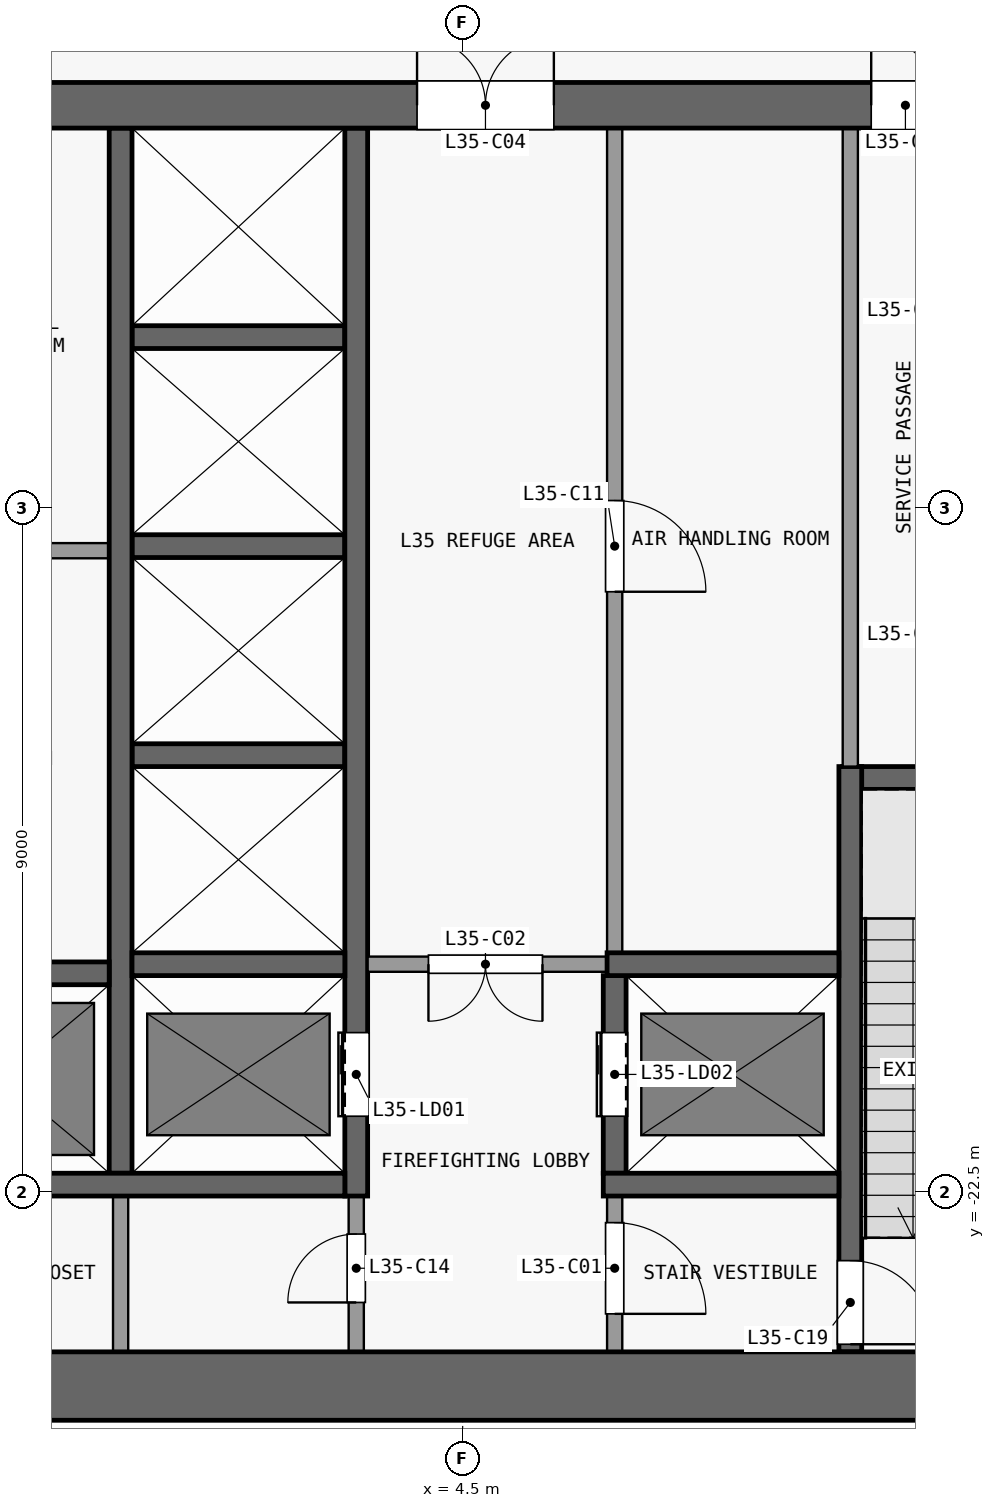
"""IFC4 building model, lengths in metres.
Left out: names, types, materials, properties, quantities, classifications, styles, units other than length and angle.
Written with IfcOpenShell. Run it as: python <this file> out.ifc"""

import sys

from ifc_helpers import new_model, si_unit, direction, frame, frame_2d, origin, place, context, subcontext, project, spatial, rectangle, extrude, element, fill, save


model = new_model("IFC4")
c1 = context("Model", 3, precision=1e-05, world=origin(), true_north=direction((0.0, 1.0)))
c2 = subcontext(c1, "Body", "Model", "MODEL_VIEW")
j1 = project(units=[si_unit("LENGTHUNIT", "METRE"), si_unit("PLANEANGLEUNIT", "RADIAN")], contexts=[c1])
p1 = place(None, origin())
s1 = spatial("IfcSite", under=j1, at=p1, CompositionType="ELEMENT")
p2 = place(p1, origin())
s2 = spatial("IfcBuilding", under=s1, at=p2, CompositionType="ELEMENT")
p3 = place(p2, frame((0.0, 0.0, 143.9)))
s3 = spatial("IfcBuildingStorey", under=s2, at=p3, CompositionType="ELEMENT", Elevation=143.9)
p4 = place(p3, frame((-13.5, -25.05, 0.0), z_axis=(0.0, 0.0, 1.0), x_axis=(1.0, 0.0, 0.0)))
e1 = element("IfcWall", 1, at=p4, inside=s3, PredefinedType="SHEAR", context=c2, shape_type="SweptSolid", body=[
    extrude(rectangle(XDim=27.0, YDim=0.9, at=frame_2d((13.5, 0.0))), origin(), (0.0, 0.0, 1.0), 5.0),
])
p5 = place(p3, frame((-13.5, -8.2, 0.0), z_axis=(0.0, 0.0, 1.0), x_axis=(1.0, 0.0, 0.0)))
e2 = element("IfcWall", 2, at=p5, inside=s3, PredefinedType="SHEAR", context=c2, shape_type="SweptSolid", body=[
    extrude(rectangle(XDim=27.0, YDim=0.6, at=frame_2d((13.5, 0.0))), origin(), (0.0, 0.0, 1.0), 5.0),
])
p6 = place(p5, frame((7.8, 0.0, 0.0)))
e3 = element("IfcOpeningElement", 3, at=p6, cuts=e2, PredefinedType="OPENING", context=c2, shape_type="SweptSolid", body=[
    extrude(rectangle(XDim=1.8, YDim=2.1, at=frame_2d((0.9, 1.05))), frame((0.0, 0.31, 0.0), z_axis=(0.0, -1.0, 0.0), x_axis=(1.0, 0.0, 0.0)), (0.0, 0.0, 1.0), 0.62),
])
p7 = place(p5, frame((17.4, 0.0, 0.0)))
e4 = element("IfcOpeningElement", 4, at=p7, cuts=e2, PredefinedType="OPENING", context=c2, shape_type="SweptSolid", body=[
    extrude(rectangle(XDim=1.8, YDim=2.1, at=frame_2d((0.9, 1.05))), frame((0.0, 0.31, 0.0), z_axis=(0.0, -1.0, 0.0), x_axis=(1.0, 0.0, 0.0)), (0.0, 0.0, 1.0), 0.62),
])
p8 = place(p5, frame((2.725, 0.0, 0.0)))
e5 = element("IfcOpeningElement", 5, at=p8, cuts=e2, PredefinedType="OPENING", context=c2, shape_type="SweptSolid", body=[
    extrude(rectangle(XDim=0.9, YDim=2.1, at=frame_2d((0.45, 1.05))), frame((0.0, 0.31, 0.0), z_axis=(0.0, -1.0, 0.0), x_axis=(1.0, 0.0, 0.0)), (0.0, 0.0, 1.0), 0.62),
])
p9 = place(p5, frame((23.375, 0.0, 0.0)))
e6 = element("IfcOpeningElement", 6, at=p9, cuts=e2, PredefinedType="OPENING", context=c2, shape_type="SweptSolid", body=[
    extrude(rectangle(XDim=0.9, YDim=2.1, at=frame_2d((0.45, 1.05))), frame((0.0, 0.31, 0.0), z_axis=(0.0, -1.0, 0.0), x_axis=(1.0, 0.0, 0.0)), (0.0, 0.0, 1.0), 0.62),
])
p10 = place(p3, frame((-3.25, -22.4, 0.0), z_axis=(0.0, 0.0, 1.0), x_axis=(1.0, 0.0, 0.0)))
e7 = element("IfcWall", 7, at=p10, inside=s3, PredefinedType="SHEAR", context=c2, shape_type="SweptSolid", body=[
    extrude(rectangle(XDim=6.2, YDim=0.3, at=frame_2d((3.1, 0.0))), origin(), (0.0, 0.0, 1.0), 5.0),
])
p11 = place(p3, frame((6.35, -22.4, 0.0), z_axis=(0.0, 0.0, 1.0), x_axis=(1.0, 0.0, 0.0)))
e8 = element("IfcWall", 8, at=p11, inside=s3, PredefinedType="SHEAR", context=c2, shape_type="SweptSolid", body=[
    extrude(rectangle(XDim=3.1, YDim=0.3, at=frame_2d((1.55, 0.0))), origin(), (0.0, 0.0, 1.0), 5.0),
])
p12 = place(p3, frame((-3.2, -19.62, 0.0), z_axis=(0.0, 0.0, 1.0), x_axis=(1.0, 0.0, 0.0)))
e9 = element("IfcWall", 9, at=p12, inside=s3, PredefinedType="SHEAR", context=c2, shape_type="SweptSolid", body=[
    extrude(rectangle(XDim=3.05, YDim=0.3, at=frame_2d((1.525, 0.0))), origin(), (0.0, 0.0, 1.0), 5.0),
])
p13 = place(p3, frame((0.15, -19.5, 0.0), z_axis=(0.0, 0.0, 1.0), x_axis=(1.0, 0.0, 0.0)))
e10 = element("IfcWall", 10, at=p13, inside=s3, PredefinedType="SHEAR", context=c2, shape_type="SweptSolid", body=[
    extrude(rectangle(XDim=2.8, YDim=0.3, at=frame_2d((1.4, 0.0))), origin(), (0.0, 0.0, 1.0), 5.0),
])
p14 = place(p3, frame((6.4, -19.5, 0.0), z_axis=(0.0, 0.0, 1.0), x_axis=(-1.0, 0.0, 0.0)))
e11 = element("IfcWall", 11, at=p14, inside=s3, PredefinedType="PARTITIONING", context=c2, shape_type="SweptSolid", body=[
    extrude(rectangle(XDim=3.15, YDim=0.2, at=frame_2d((1.575, 0.0))), origin(), (0.0, 0.0, 1.0), 5.0),
])
p15 = place(p14, frame((0.85, 0.0, 0.0)))
e12 = element("IfcOpeningElement", 12, at=p15, cuts=e11, PredefinedType="OPENING", context=c2, shape_type="SweptSolid", body=[
    extrude(rectangle(XDim=1.5, YDim=2.1, at=frame_2d((0.75, 1.05))), frame((0.0, 0.11, 0.0), z_axis=(0.0, -1.0, 0.0), x_axis=(1.0, 0.0, 0.0)), (0.0, 0.0, 1.0), 0.22),
])
p16 = place(p3, frame((6.4, -19.5, 0.0), z_axis=(0.0, 0.0, 1.0), x_axis=(1.0, 0.0, 0.0)))
e13 = element("IfcWall", 13, at=p16, inside=s3, PredefinedType="SHEAR", context=c2, shape_type="SweptSolid", body=[
    extrude(rectangle(XDim=3.05, YDim=0.3, at=frame_2d((1.525, 0.0))), origin(), (0.0, 0.0, 1.0), 5.0),
])
p17 = place(p3, frame((9.5, -17.05, 0.0), z_axis=(0.0, 0.0, 1.0), x_axis=(1.0, 0.0, 0.0)))
e14 = element("IfcWall", 14, at=p17, inside=s3, PredefinedType="SHEAR", context=c2, shape_type="SweptSolid", body=[
    extrude(rectangle(XDim=3.1, YDim=0.3, at=frame_2d((1.55, 0.0))), origin(), (0.0, 0.0, 1.0), 5.0),
])
p18 = place(p3, frame((0.15, -16.75, 0.0), z_axis=(0.0, 0.0, 1.0), x_axis=(1.0, 0.0, 0.0)))
e15 = element("IfcWall", 15, at=p18, inside=s3, PredefinedType="SHEAR", context=c2, shape_type="SweptSolid", body=[
    extrude(rectangle(XDim=2.8, YDim=0.3, at=frame_2d((1.4, 0.0))), origin(), (0.0, 0.0, 1.0), 5.0),
])
p19 = place(p3, frame((-3.0, -14.06, 0.0), z_axis=(0.0, 0.0, 1.0), x_axis=(1.0, 0.0, 0.0)))
e16 = element("IfcWall", 16, at=p19, inside=s3, PredefinedType="PARTITIONING", context=c2, shape_type="SweptSolid", body=[
    extrude(rectangle(XDim=2.85, YDim=0.2, at=frame_2d((1.425, 0.0))), origin(), (0.0, 0.0, 1.0), 5.0),
])
for number, where, z_axis, x_axis in (
    (17, (0.15, -14.0, 0.0), (0.0, 0.0, 1.0), (1.0, 0.0, 0.0)),
    (18, (0.15, -11.25, 0.0), (0.0, 0.0, 1.0), (1.0, 0.0, 0.0)),
):
    element("IfcWall", number, at=place(p3, frame(where, z_axis=z_axis, x_axis=x_axis)), inside=s3, PredefinedType="SHEAR", context=c2, shape_type="SweptSolid", body=[
        extrude(rectangle(XDim=2.8, YDim=0.3, at=frame_2d((1.4, 0.0))), origin(), (0.0, 0.0, 1.0), 5.0),
    ])
p20 = place(p3, frame((0.0, -24.6, 0.0), z_axis=(0.0, 0.0, 1.0), x_axis=(0.0, 1.0, 0.0)))
e19 = element("IfcWall", 19, at=p20, inside=s3, PredefinedType="PARTITIONING", context=c2, shape_type="SweptSolid", body=[
    extrude(rectangle(XDim=2.05, YDim=0.2, at=frame_2d((1.025, 0.0))), origin(), (0.0, 0.0, 1.0), 5.0),
])
p21 = place(p3, frame((0.0, -22.25, 0.0), z_axis=(0.0, 0.0, 1.0), x_axis=(0.0, 1.0, 0.0)))
e20 = element("IfcWall", 20, at=p21, inside=s3, PredefinedType="SHEAR", context=c2, shape_type="SweptSolid", body=[
    extrude(rectangle(XDim=13.75, YDim=0.3, at=frame_2d((6.875, 0.0))), origin(), (0.0, 0.0, 1.0), 5.0),
])
p22 = place(p3, frame((3.1, -24.6, 0.0), z_axis=(0.0, 0.0, 1.0), x_axis=(0.0, 1.0, 0.0)))
e21 = element("IfcWall", 21, at=p22, inside=s3, PredefinedType="PARTITIONING", context=c2, shape_type="SweptSolid", body=[
    extrude(rectangle(XDim=2.05, YDim=0.2, at=frame_2d((1.025, 0.0))), origin(), (0.0, 0.0, 1.0), 5.0),
])
p23 = place(p22, frame((0.65, 0.0, 0.0)))
e22 = element("IfcOpeningElement", 22, at=p23, cuts=e21, PredefinedType="OPENING", context=c2, shape_type="SweptSolid", body=[
    extrude(rectangle(XDim=0.9, YDim=2.1, at=frame_2d((0.45, 1.05))), frame((0.0, 0.11, 0.0), z_axis=(0.0, -1.0, 0.0), x_axis=(1.0, 0.0, 0.0)), (0.0, 0.0, 1.0), 0.22),
])
p24 = place(p3, frame((3.1, -22.55, 0.0), z_axis=(0.0, 0.0, 1.0), x_axis=(0.0, 1.0, 0.0)))
e23 = element("IfcWall", 23, at=p24, inside=s3, PredefinedType="SHEAR", context=c2, shape_type="SweptSolid", body=[
    extrude(rectangle(XDim=14.05, YDim=0.3, at=frame_2d((7.025, 0.0))), origin(), (0.0, 0.0, 1.0), 5.0),
])
p25 = place(p24, frame((1.05, 0.0, 0.0)))
e24 = element("IfcOpeningElement", 24, at=p25, cuts=e23, PredefinedType="OPENING", context=c2, shape_type="SweptSolid", body=[
    extrude(rectangle(XDim=1.1, YDim=2.1, at=frame_2d((0.55, 1.05))), frame((0.0, 0.16, 0.0), z_axis=(0.0, -1.0, 0.0), x_axis=(1.0, 0.0, 0.0)), (0.0, 0.0, 1.0), 0.32),
])
p26 = place(p3, frame((6.5, -22.55, 0.0), z_axis=(0.0, 0.0, 1.0), x_axis=(0.0, -1.0, 0.0)))
e25 = element("IfcWall", 25, at=p26, inside=s3, PredefinedType="PARTITIONING", context=c2, shape_type="SweptSolid", body=[
    extrude(rectangle(XDim=2.05, YDim=0.2, at=frame_2d((1.025, 0.0))), origin(), (0.0, 0.0, 1.0), 5.0),
])
p27 = place(p26, frame((0.35, 0.0, 0.0)))
e26 = element("IfcOpeningElement", 26, at=p27, cuts=e25, PredefinedType="OPENING", context=c2, shape_type="SweptSolid", body=[
    extrude(rectangle(XDim=1.2, YDim=2.1, at=frame_2d((0.6, 1.05))), frame((0.0, 0.11, 0.0), z_axis=(0.0, -1.0, 0.0), x_axis=(1.0, 0.0, 0.0)), (0.0, 0.0, 1.0), 0.22),
])
p28 = place(p3, frame((6.5, -22.25, 0.0), z_axis=(0.0, 0.0, 1.0), x_axis=(0.0, 1.0, 0.0)))
e27 = element("IfcWall", 27, at=p28, inside=s3, PredefinedType="SHEAR", context=c2, shape_type="SweptSolid", body=[
    extrude(rectangle(XDim=2.6, YDim=0.3, at=frame_2d((1.3, 0.0))), origin(), (0.0, 0.0, 1.0), 5.0),
])
p29 = place(p28, frame((0.75, 0.0, 0.0)))
e28 = element("IfcOpeningElement", 28, at=p29, cuts=e27, PredefinedType="OPENING", context=c2, shape_type="SweptSolid", body=[
    extrude(rectangle(XDim=1.1, YDim=2.1, at=frame_2d((0.55, 1.05))), frame((0.0, 0.16, 0.0), z_axis=(0.0, -1.0, 0.0), x_axis=(1.0, 0.0, 0.0)), (0.0, 0.0, 1.0), 0.32),
])
p30 = place(p3, frame((6.5, -8.5, 0.0), z_axis=(0.0, 0.0, 1.0), x_axis=(0.0, -1.0, 0.0)))
e29 = element("IfcWall", 29, at=p30, inside=s3, PredefinedType="PARTITIONING", context=c2, shape_type="SweptSolid", body=[
    extrude(rectangle(XDim=10.85, YDim=0.2, at=frame_2d((5.425, 0.0))), origin(), (0.0, 0.0, 1.0), 5.0),
])
p31 = place(p30, frame((4.9, 0.0, 0.0)))
e30 = element("IfcOpeningElement", 30, at=p31, cuts=e29, PredefinedType="OPENING", context=c2, shape_type="SweptSolid", body=[
    extrude(rectangle(XDim=1.2, YDim=2.1, at=frame_2d((0.6, 1.05))), frame((0.0, 0.11, 0.0), z_axis=(0.0, -1.0, 0.0), x_axis=(1.0, 0.0, 0.0)), (0.0, 0.0, 1.0), 0.22),
])
p32 = place(p3, frame((9.6, -16.9, 0.0), z_axis=(0.0, 0.0, 1.0), x_axis=(0.0, -1.0, 0.0)))
e31 = element("IfcWall", 31, at=p32, inside=s3, PredefinedType="SHEAR", context=c2, shape_type="SweptSolid", body=[
    extrude(rectangle(XDim=7.7, YDim=0.3, at=frame_2d((3.85, 0.0))), origin(), (0.0, 0.0, 1.0), 5.0),
])
p33 = place(p32, frame((6.5, 0.0, 0.0)))
e32 = element("IfcOpeningElement", 32, at=p33, cuts=e31, PredefinedType="OPENING", context=c2, shape_type="SweptSolid", body=[
    extrude(rectangle(XDim=1.1, YDim=2.1, at=frame_2d((0.55, 1.05))), frame((0.0, 0.16, 0.0), z_axis=(0.0, -1.0, 0.0), x_axis=(1.0, 0.0, 0.0)), (0.0, 0.0, 1.0), 0.32),
])
p34 = place(p3, frame((9.6, -16.9, 0.0), z_axis=(0.0, 0.0, 1.0), x_axis=(0.0, 1.0, 0.0)))
e33 = element("IfcWall", 33, at=p34, inside=s3, PredefinedType="PARTITIONING", context=c2, shape_type="SweptSolid", body=[
    extrude(rectangle(XDim=8.4, YDim=0.2, at=frame_2d((4.2, 0.0))), origin(), (0.0, 0.0, 1.0), 5.0),
])
p35 = place(p25, origin())
e34 = element("IfcDoor", 34, at=p35, inside=s3, OperationType="DOUBLE_DOOR_SLIDING", PredefinedType="DOOR", context=c2, shape_type="SweptSolid", body=[
    extrude(rectangle(XDim=1.1, YDim=2.1, at=frame_2d((0.55, 1.05))), frame((0.0, 0.025, 0.0), z_axis=(0.0, -1.0, 0.0), x_axis=(1.0, 0.0, 0.0)), (0.0, 0.0, 1.0), 0.05),
])
fill(e24, e34)
p36 = place(p29, origin())
e35 = element("IfcDoor", 35, at=p36, inside=s3, OperationType="DOUBLE_DOOR_SLIDING", PredefinedType="DOOR", context=c2, shape_type="SweptSolid", body=[
    extrude(rectangle(XDim=1.1, YDim=2.1, at=frame_2d((0.55, 1.05))), frame((0.0, 0.025, 0.0), z_axis=(0.0, -1.0, 0.0), x_axis=(1.0, 0.0, 0.0)), (0.0, 0.0, 1.0), 0.05),
])
fill(e28, e35)
p37 = place(p27, origin())
e36 = element("IfcDoor", 36, at=p37, inside=s3, OperationType="SINGLE_SWING_RIGHT", PredefinedType="DOOR", context=c2, shape_type="SweptSolid", body=[
    extrude(rectangle(XDim=1.2, YDim=2.1, at=frame_2d((0.6, 1.05))), frame((0.0, 0.025, 0.0), z_axis=(0.0, -1.0, 0.0), x_axis=(1.0, 0.0, 0.0)), (0.0, 0.0, 1.0), 0.05),
])
fill(e26, e36)
p38 = place(p15, origin())
e37 = element("IfcDoor", 37, at=p38, inside=s3, OperationType="DOUBLE_DOOR_SINGLE_SWING", PredefinedType="DOOR", context=c2, shape_type="SweptSolid", body=[
    extrude(rectangle(XDim=1.5, YDim=2.1, at=frame_2d((0.75, 1.05))), frame((0.0, 0.025, 0.0), z_axis=(0.0, -1.0, 0.0), x_axis=(1.0, 0.0, 0.0)), (0.0, 0.0, 1.0), 0.05),
])
fill(e12, e37)
p39 = place(p7, origin())
e38 = element("IfcDoor", 38, at=p39, inside=s3, OperationType="DOUBLE_DOOR_SINGLE_SWING", PredefinedType="DOOR", context=c2, shape_type="SweptSolid", body=[
    extrude(rectangle(XDim=1.8, YDim=2.1, at=frame_2d((0.9, 1.05))), frame((0.0, 0.025, 0.0), z_axis=(0.0, -1.0, 0.0), x_axis=(1.0, 0.0, 0.0)), (0.0, 0.0, 1.0), 0.05),
])
fill(e4, e38)
p40 = place(p31, origin())
e39 = element("IfcDoor", 39, at=p40, inside=s3, OperationType="SINGLE_SWING_RIGHT", PredefinedType="DOOR", context=c2, shape_type="SweptSolid", body=[
    extrude(rectangle(XDim=1.2, YDim=2.1, at=frame_2d((0.6, 1.05))), frame((0.0, 0.025, 0.0), z_axis=(0.0, -1.0, 0.0), x_axis=(1.0, 0.0, 0.0)), (0.0, 0.0, 1.0), 0.05),
])
fill(e30, e39)
p41 = place(p9, origin())
e40 = element("IfcDoor", 40, at=p41, inside=s3, OperationType="SINGLE_SWING_LEFT", PredefinedType="DOOR", context=c2, shape_type="SweptSolid", body=[
    extrude(rectangle(XDim=0.9, YDim=2.1, at=frame_2d((0.45, 1.05))), frame((0.0, 0.025, 0.0), z_axis=(0.0, -1.0, 0.0), x_axis=(1.0, 0.0, 0.0)), (0.0, 0.0, 1.0), 0.05),
])
fill(e6, e40)
p42 = place(p23, origin())
e41 = element("IfcDoor", 41, at=p42, inside=s3, OperationType="SINGLE_SWING_LEFT", PredefinedType="DOOR", context=c2, shape_type="SweptSolid", body=[
    extrude(rectangle(XDim=0.9, YDim=2.1, at=frame_2d((0.45, 1.05))), frame((0.0, 0.025, 0.0), z_axis=(0.0, -1.0, 0.0), x_axis=(1.0, 0.0, 0.0)), (0.0, 0.0, 1.0), 0.05),
])
fill(e22, e41)
p43 = place(p33, origin())
e42 = element("IfcDoor", 42, at=p43, inside=s3, OperationType="SINGLE_SWING_RIGHT", PredefinedType="DOOR", context=c2, shape_type="SweptSolid", body=[
    extrude(rectangle(XDim=1.1, YDim=2.1, at=frame_2d((0.55, 1.05))), frame((0.0, 0.025, 0.0), z_axis=(0.0, -1.0, 0.0), x_axis=(1.0, 0.0, 0.0)), (0.0, 0.0, 1.0), 0.05),
])
fill(e32, e42)
save(model, sys.argv[1])
